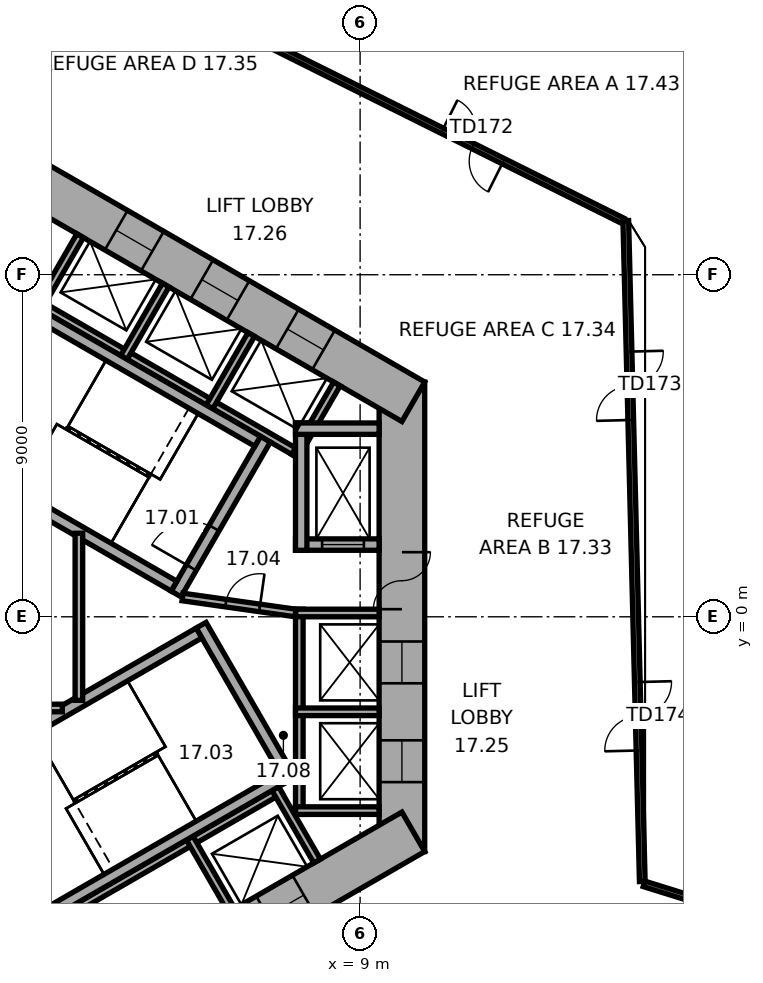
"""IFC4 building model, lengths in metres.
Left out: names, types, materials, properties, quantities, classifications, styles, units other than length and angle.
Written with IfcOpenShell. Run it as: python <this file> out.ifc"""

import sys

from ifc_helpers import new_model, si_unit, direction, frame, frame_2d, origin, place, context, subcontext, project, spatial, rectangle, extrude, element, fill, save


model = new_model("IFC4")
c1 = context("Model", 3, precision=1e-05, world=origin(), true_north=direction((0.0, 1.0)))
c2 = subcontext(c1, "Body", "Model", "MODEL_VIEW")
j1 = project(units=[si_unit("LENGTHUNIT", "METRE"), si_unit("PLANEANGLEUNIT", "RADIAN")], contexts=[c1])
p1 = place(None, origin())
s1 = spatial("IfcSite", under=j1, at=p1, CompositionType="ELEMENT")
p2 = place(p1, origin())
s2 = spatial("IfcBuilding", under=s1, at=p2, CompositionType="ELEMENT")
p3 = place(p2, frame((0.0, 0.0, 77.0)))
s3 = spatial("IfcBuildingStorey", under=s2, at=p3, CompositionType="ELEMENT", Elevation=77.0)
p4 = place(p3, frame((10.1, -6.177, 0.0), z_axis=(0.0, 0.0, 1.0), x_axis=(0.0, 1.0, 0.0)))
e1 = element("IfcWall", 1, at=p4, inside=s3, PredefinedType="SHEAR", context=c2, shape_type="SweptSolid", body=[
    extrude(rectangle(XDim=12.355, YDim=1.2, at=frame_2d((6.177, 0.0))), origin(), (0.0, 0.0, 1.0), 6.6),
])
p5 = place(p4, frame((6.378, 0.0, 0.0)))
e2 = element("IfcOpeningElement", 2, at=p5, cuts=e1, PredefinedType="OPENING", context=c2, shape_type="SweptSolid", body=[
    extrude(rectangle(XDim=1.5, YDim=2.1, at=frame_2d((0.75, 1.05))), frame((0.0, 0.61, 0.0), z_axis=(0.0, -1.0, 0.0), x_axis=(1.0, 0.0, 0.0)), (0.0, 0.0, 1.0), 1.22),
])
p6 = place(p4, frame((1.828, 0.0, 0.0)))
e3 = element("IfcOpeningElement", 3, at=p6, cuts=e1, PredefinedType="OPENING", context=c2, shape_type="SweptSolid", body=[
    extrude(rectangle(XDim=1.1, YDim=2.1, at=frame_2d((0.55, 1.05))), frame((0.0, 0.61, 0.0), z_axis=(0.0, -1.0, 0.0), x_axis=(1.0, 0.0, 0.0)), (0.0, 0.0, 1.0), 1.22),
])
p7 = place(p4, frame((4.427, 0.0, 0.0)))
e4 = element("IfcOpeningElement", 4, at=p7, cuts=e1, PredefinedType="OPENING", context=c2, shape_type="SweptSolid", body=[
    extrude(rectangle(XDim=1.1, YDim=2.1, at=frame_2d((0.55, 1.05))), frame((0.0, 0.61, 0.0), z_axis=(0.0, -1.0, 0.0), x_axis=(1.0, 0.0, 0.0)), (0.0, 0.0, 1.0), 1.22),
])
p8 = place(p3, frame((10.4, 5.658, 0.0), z_axis=(0.0, 0.0, 1.0), x_axis=(-0.866021384402, 0.500006961711, 0.0)))
e5 = element("IfcWall", 5, at=p8, inside=s3, PredefinedType="SHEAR", context=c2, shape_type="SweptSolid", body=[
    extrude(rectangle(XDim=12.355, YDim=1.2, at=frame_2d((6.178, 0.0))), origin(), (0.0, 0.0, 1.0), 6.6),
])
p9 = place(p8, frame((2.728, 0.0, 0.0)))
e6 = element("IfcOpeningElement", 6, at=p9, cuts=e5, PredefinedType="OPENING", context=c2, shape_type="SweptSolid", body=[
    extrude(rectangle(XDim=1.1, YDim=2.1, at=frame_2d((0.55, 1.05))), frame((0.0, 0.61, 0.0), z_axis=(0.0, -1.0, 0.0), x_axis=(1.0, 0.0, 0.0)), (0.0, 0.0, 1.0), 1.22),
])
p10 = place(p8, frame((5.328, 0.0, 0.0)))
e7 = element("IfcOpeningElement", 7, at=p10, cuts=e5, PredefinedType="OPENING", context=c2, shape_type="SweptSolid", body=[
    extrude(rectangle(XDim=1.1, YDim=2.1, at=frame_2d((0.55, 1.05))), frame((0.0, 0.61, 0.0), z_axis=(0.0, -1.0, 0.0), x_axis=(1.0, 0.0, 0.0)), (0.0, 0.0, 1.0), 1.22),
])
p11 = place(p8, frame((7.928, 0.0, 0.0)))
e8 = element("IfcOpeningElement", 8, at=p11, cuts=e5, PredefinedType="OPENING", context=c2, shape_type="SweptSolid", body=[
    extrude(rectangle(XDim=1.1, YDim=2.1, at=frame_2d((0.55, 1.05))), frame((0.0, 0.61, 0.0), z_axis=(0.0, -1.0, 0.0), x_axis=(1.0, 0.0, 0.0)), (0.0, 0.0, 1.0), 1.22),
])
p12 = place(p3, frame((-0.3, -11.836, 0.0), z_axis=(0.0, 0.0, 1.0), x_axis=(0.866021384402, 0.500006961711, 0.0)))
e9 = element("IfcWall", 9, at=p12, inside=s3, PredefinedType="SHEAR", context=c2, shape_type="SweptSolid", body=[
    extrude(rectangle(XDim=12.355, YDim=1.2, at=frame_2d((6.178, 0.0))), origin(), (0.0, 0.0, 1.0), 6.6),
])
p13 = place(p12, frame((4.128, 0.0, 0.0)))
e10 = element("IfcOpeningElement", 10, at=p13, cuts=e9, PredefinedType="OPENING", context=c2, shape_type="SweptSolid", body=[
    extrude(rectangle(XDim=0.9, YDim=2.1, at=frame_2d((0.45, 1.05))), frame((0.0, 0.61, 0.0), z_axis=(0.0, -1.0, 0.0), x_axis=(1.0, 0.0, 0.0)), (0.0, 0.0, 1.0), 1.22),
])
p14 = place(p12, frame((7.928, 0.0, 0.0)))
e11 = element("IfcOpeningElement", 11, at=p14, cuts=e9, PredefinedType="OPENING", context=c2, shape_type="SweptSolid", body=[
    extrude(rectangle(XDim=1.1, YDim=2.1, at=frame_2d((0.55, 1.05))), frame((0.0, 0.61, 0.0), z_axis=(0.0, -1.0, 0.0), x_axis=(1.0, 0.0, 0.0)), (0.0, 0.0, 1.0), 1.22),
])
p15 = place(p3, frame((0.113, 18.297, 0.0), z_axis=(0.0, 0.0, 1.0), x_axis=(0.894932628477, -0.446201289204, 0.0)))
e12 = element("IfcWall", 12, at=p15, inside=s3, PredefinedType="STANDARD", context=c2, shape_type="SweptSolid", body=[
    extrude(rectangle(XDim=17.659, YDim=0.15, at=frame_2d((8.83, 0.0))), origin(), (0.0, 0.0, 1.0), 2.6),
])
p16 = place(p15, frame((3.515, 0.0, 0.0)))
e13 = element("IfcOpeningElement", 13, at=p16, cuts=e12, PredefinedType="OPENING", context=c2, shape_type="SweptSolid", body=[
    extrude(rectangle(XDim=1.8, YDim=2.4, at=frame_2d((0.9, 1.2))), frame((0.0, 0.085, 0.0), z_axis=(0.0, -1.0, 0.0), x_axis=(1.0, 0.0, 0.0)), (0.0, 0.0, 1.0), 0.17),
])
p17 = place(p15, frame((12.344, 0.0, 0.0)))
e14 = element("IfcOpeningElement", 14, at=p17, cuts=e12, PredefinedType="OPENING", context=c2, shape_type="SweptSolid", body=[
    extrude(rectangle(XDim=1.8, YDim=2.4, at=frame_2d((0.9, 1.2))), frame((0.0, 0.085, 0.0), z_axis=(0.0, -1.0, 0.0), x_axis=(1.0, 0.0, 0.0)), (0.0, 0.0, 1.0), 0.17),
])
p18 = place(p3, frame((15.991, 10.425, 0.0), z_axis=(0.0, 0.0, 1.0), x_axis=(0.024967645853, -0.999688259739, 0.0)))
e15 = element("IfcWall", 15, at=p18, inside=s3, PredefinedType="STANDARD", context=c2, shape_type="SweptSolid", body=[
    extrude(rectangle(XDim=17.396, YDim=0.15, at=frame_2d((8.698, 0.0))), origin(), (0.0, 0.0, 1.0), 2.6),
])
p19 = place(p18, frame((3.449, 0.0, 0.0)))
e16 = element("IfcOpeningElement", 16, at=p19, cuts=e15, PredefinedType="OPENING", context=c2, shape_type="SweptSolid", body=[
    extrude(rectangle(XDim=1.8, YDim=2.4, at=frame_2d((0.9, 1.2))), frame((0.0, 0.085, 0.0), z_axis=(0.0, -1.0, 0.0), x_axis=(1.0, 0.0, 0.0)), (0.0, 0.0, 1.0), 0.17),
])
p20 = place(p18, frame((12.147, 0.0, 0.0)))
e17 = element("IfcOpeningElement", 17, at=p20, cuts=e15, PredefinedType="OPENING", context=c2, shape_type="SweptSolid", body=[
    extrude(rectangle(XDim=1.8, YDim=2.4, at=frame_2d((0.9, 1.2))), frame((0.0, 0.085, 0.0), z_axis=(0.0, -1.0, 0.0), x_axis=(1.0, 0.0, 0.0)), (0.0, 0.0, 1.0), 0.17),
])
p21 = place(p3, frame((16.471, -7.027, 0.0), z_axis=(0.0, 0.0, 1.0), x_axis=(0.954937386514, -0.296807324434, 0.0)))
e18 = element("IfcWall", 18, at=p21, inside=s3, PredefinedType="STANDARD", context=c2, shape_type="SweptSolid", body=[
    extrude(rectangle(XDim=5.362, YDim=0.15, at=frame_2d((2.681, 0.0))), origin(), (0.0, 0.0, 1.0), 2.6),
])
p22 = place(p3, frame((7.4, -5.2, 0.0), z_axis=(0.0, 0.0, 1.0), x_axis=(0.0, 1.0, 0.0)))
e19 = element("IfcWall", 19, at=p22, inside=s3, PredefinedType="PARTITIONING", context=c2, shape_type="SweptSolid", body=[
    extrude(rectangle(XDim=5.4, YDim=0.2, at=frame_2d((2.7, 0.0))), origin(), (0.0, 0.0, 1.0), 6.35),
])
for number, where, z_axis, x_axis in (
    (20, (7.3, -5.1, 0.0), (0.0, 0.0, 1.0), (1.0, 0.0, 0.0)),
    (21, (7.3, -2.5, 0.0), (0.0, 0.0, 1.0), (1.0, 0.0, 0.0)),
    (22, (7.3, 0.1, 0.0), (0.0, 0.0, 1.0), (1.0, 0.0, 0.0)),
):
    element("IfcWall", number, at=place(p3, frame(where, z_axis=z_axis, x_axis=x_axis)), inside=s3, PredefinedType="PARTITIONING", context=c2, shape_type="SweptSolid", body=[
        extrude(rectangle(XDim=2.2, YDim=0.2, at=frame_2d((1.1, 0.0))), origin(), (0.0, 0.0, 1.0), 6.35),
    ])
p23 = place(p3, frame((7.424, 4.259, 0.0), z_axis=(0.0, 0.0, 1.0), x_axis=(-0.866026010844, 0.49999894854, 0.0)))
e23 = element("IfcWall", 23, at=p23, inside=s3, PredefinedType="PARTITIONING", context=c2, shape_type="SweptSolid", body=[
    extrude(rectangle(XDim=8.0, YDim=0.2, at=frame_2d((4.0, 0.0))), origin(), (0.0, 0.0, 1.0), 6.35),
])
for number, where, z_axis, x_axis in (
    (24, (7.287, 4.222, 0.0), (0.0, 0.0, 1.0), (0.5, 0.866, 0.0)),
    (25, (5.036, 5.522, 0.0), (0.0, 0.0, 1.0), (0.5, 0.866, 0.0)),
    (26, (2.784, 6.822, 0.0), (0.0, 0.0, 1.0), (0.5, 0.866, 0.0)),
    (27, (0.532, 8.122, 0.0), (0.0, 0.0, 1.0), (0.5, 0.866, 0.0)),
):
    element("IfcWall", number, at=place(p3, frame(where, z_axis=z_axis, x_axis=x_axis)), inside=s3, PredefinedType="PARTITIONING", context=c2, shape_type="SweptSolid", body=[
        extrude(rectangle(XDim=2.2, YDim=0.2, at=frame_2d((1.1, 0.0))), origin(), (0.0, 0.0, 1.0), 6.35),
    ])
p24 = place(p3, frame((-0.024, -8.559, 0.0), z_axis=(0.0, 0.0, 1.0), x_axis=(0.866026010844, 0.49999894854, 0.0)))
e28 = element("IfcWall", 28, at=p24, inside=s3, PredefinedType="PARTITIONING", context=c2, shape_type="SweptSolid", body=[
    extrude(rectangle(XDim=8.0, YDim=0.2, at=frame_2d((4.0, 0.0))), origin(), (0.0, 0.0, 1.0), 6.35),
])
for number, where, z_axis, x_axis in (
    (29, (4.516, -5.822, 0.0), (0.0, 0.0, 1.0), (0.5, -0.866, 0.0)),
    (30, (6.768, -4.522, 0.0), (0.0, 0.0, 1.0), (0.5, -0.866, 0.0)),
):
    element("IfcWall", number, at=place(p3, frame(where, z_axis=z_axis, x_axis=x_axis)), inside=s3, PredefinedType="PARTITIONING", context=c2, shape_type="SweptSolid", body=[
        extrude(rectangle(XDim=2.2, YDim=0.2, at=frame_2d((1.1, 0.0))), origin(), (0.0, 0.0, 1.0), 6.35),
    ])
p25 = place(p3, frame((4.158, 0.602, 0.0), z_axis=(0.0, 0.0, 1.0), x_axis=(0.499977259774, 0.866038532462, 0.0)))
e31 = element("IfcWall", 31, at=p25, inside=s3, PredefinedType="SHEAR", context=c2, shape_type="SweptSolid", body=[
    extrude(rectangle(XDim=4.7, YDim=0.3, at=frame_2d((2.35, 0.0))), origin(), (0.0, 0.0, 1.0), 6.35),
])
p26 = place(p25, frame((0.8, 0.0, 0.0)))
e32 = element("IfcOpeningElement", 32, at=p26, cuts=e31, PredefinedType="OPENING", context=c2, shape_type="SweptSolid", body=[
    extrude(rectangle(XDim=1.2, YDim=2.1, at=frame_2d((0.6, 1.05))), frame((0.0, 0.16, 0.0), z_axis=(0.0, -1.0, 0.0), x_axis=(1.0, 0.0, 0.0)), (0.0, 0.0, 1.0), 0.32),
])
for number, where, z_axis, x_axis in (
    (33, (4.103, 0.807, 0.0), (0.0, 0.0, 1.0), (-0.866, 0.5, 0.0)),
    (34, (6.303, 4.617, 0.0), (0.0, 0.0, 1.0), (-0.866, 0.5, 0.0)),
):
    element("IfcWall", number, at=place(p3, frame(where, z_axis=z_axis, x_axis=x_axis)), inside=s3, PredefinedType="SHEAR", context=c2, shape_type="SweptSolid", body=[
        extrude(rectangle(XDim=7.06, YDim=0.3, at=frame_2d((3.53, 0.0))), origin(), (0.0, 0.0, 1.0), 6.35),
    ])
p27 = place(p3, frame((-1.558, -3.902, 0.0), z_axis=(0.0, 0.0, 1.0), x_axis=(0.499977259774, -0.866038532462, 0.0)))
e35 = element("IfcWall", 35, at=p27, inside=s3, PredefinedType="SHEAR", context=c2, shape_type="SweptSolid", body=[
    extrude(rectangle(XDim=4.7, YDim=0.3, at=frame_2d((2.35, 0.0))), origin(), (0.0, 0.0, 1.0), 6.35),
])
p28 = place(p27, frame((0.8, 0.0, 0.0)))
e36 = element("IfcOpeningElement", 36, at=p28, cuts=e35, PredefinedType="OPENING", context=c2, shape_type="SweptSolid", body=[
    extrude(rectangle(XDim=1.2, YDim=2.1, at=frame_2d((0.6, 1.05))), frame((0.0, 0.16, 0.0), z_axis=(0.0, -1.0, 0.0), x_axis=(1.0, 0.0, 0.0)), (0.0, 0.0, 1.0), 0.32),
])
p29 = place(p3, frame((4.816, -0.222, 0.0), z_axis=(0.0, 0.0, 1.0), x_axis=(0.499977259774, -0.866038532462, 0.0)))
e37 = element("IfcWall", 37, at=p29, inside=s3, PredefinedType="SHEAR", context=c2, shape_type="SweptSolid", body=[
    extrude(rectangle(XDim=4.7, YDim=0.3, at=frame_2d((2.35, 0.0))), origin(), (0.0, 0.0, 1.0), 6.35),
])
for number, where, z_axis, x_axis in (
    (38, (-1.353, -3.957, 0.0), (0.0, 0.0, 1.0), (0.866, 0.5, 0.0)),
    (39, (0.847, -7.767, 0.0), (0.0, 0.0, 1.0), (0.866, 0.5, 0.0)),
):
    element("IfcWall", number, at=place(p3, frame(where, z_axis=z_axis, x_axis=x_axis)), inside=s3, PredefinedType="SHEAR", context=c2, shape_type="SweptSolid", body=[
        extrude(rectangle(XDim=7.06, YDim=0.3, at=frame_2d((3.53, 0.0))), origin(), (0.0, 0.0, 1.0), 6.35),
    ])
p30 = place(p3, frame((7.3, 1.9, 0.0), z_axis=(0.0, 0.0, 1.0), x_axis=(1.0, 0.0, 0.0)))
e40 = element("IfcWall", 40, at=p30, inside=s3, PredefinedType="SHEAR", context=c2, shape_type="SweptSolid", body=[
    extrude(rectangle(XDim=2.2, YDim=0.3, at=frame_2d((1.1, 0.0))), origin(), (0.0, 0.0, 1.0), 6.35),
])
p31 = place(p30, frame((0.7, 0.0, 0.0)))
e41 = element("IfcOpeningElement", 41, at=p31, cuts=e40, PredefinedType="OPENING", context=c2, shape_type="SweptSolid", body=[
    extrude(rectangle(XDim=1.1, YDim=2.1, at=frame_2d((0.55, 1.05))), frame((0.0, 0.16, 0.0), z_axis=(0.0, -1.0, 0.0), x_axis=(1.0, 0.0, 0.0)), (0.0, 0.0, 1.0), 0.32),
])
p32 = place(p3, frame((7.45, 1.75, 0.0), z_axis=(0.0, 0.0, 1.0), x_axis=(0.0, 1.0, 0.0)))
e42 = element("IfcWall", 42, at=p32, inside=s3, PredefinedType="SHEAR", context=c2, shape_type="SweptSolid", body=[
    extrude(rectangle(XDim=3.35, YDim=0.3, at=frame_2d((1.675, 0.0))), origin(), (0.0, 0.0, 1.0), 6.35),
])
p33 = place(p3, frame((7.3, 4.95, 0.0), z_axis=(0.0, 0.0, 1.0), x_axis=(1.0, 0.0, 0.0)))
e43 = element("IfcWall", 43, at=p33, inside=s3, PredefinedType="SHEAR", context=c2, shape_type="SweptSolid", body=[
    extrude(rectangle(XDim=2.2, YDim=0.3, at=frame_2d((1.1, 0.0))), origin(), (0.0, 0.0, 1.0), 6.35),
])
p34 = place(p3, frame((4.327, 0.521, 0.0), z_axis=(0.0, 0.0, 1.0), x_axis=(0.990124376366, -0.14019172346, 0.0)))
e44 = element("IfcWall", 44, at=p34, inside=s3, PredefinedType="PARTITIONING", context=c2, shape_type="SweptSolid", body=[
    extrude(rectangle(XDim=3.002, YDim=0.2, at=frame_2d((1.501, 0.0))), origin(), (0.0, 0.0, 1.0), 6.35),
])
p35 = place(p34, frame((1.15, 0.0, 0.0)))
e45 = element("IfcOpeningElement", 45, at=p35, cuts=e44, PredefinedType="OPENING", context=c2, shape_type="SweptSolid", body=[
    extrude(rectangle(XDim=0.9, YDim=2.1, at=frame_2d((0.45, 1.05))), frame((0.0, 0.11, 0.0), z_axis=(0.0, -1.0, 0.0), x_axis=(1.0, 0.0, 0.0)), (0.0, 0.0, 1.0), 0.22),
])
p36 = place(p3, frame((-2.72, -2.4, 0.0), z_axis=(0.0, 0.0, 1.0), x_axis=(1.0, 0.0, 0.0)))
e46 = element("IfcWall", 46, at=p36, inside=s3, PredefinedType="PARTITIONING", context=c2, shape_type="SweptSolid", body=[
    extrude(rectangle(XDim=3.883, YDim=0.2, at=frame_2d((1.941, 0.0))), origin(), (0.0, 0.0, 1.0), 6.35),
])
p37 = place(p3, frame((1.6, -2.198, 0.0), z_axis=(0.0, 0.0, 1.0), x_axis=(0.0, 1.0, 0.0)))
e47 = element("IfcWall", 47, at=p37, inside=s3, PredefinedType="PARTITIONING", context=c2, shape_type="SweptSolid", body=[
    extrude(rectangle(XDim=4.397, YDim=0.2, at=frame_2d((2.198, 0.0))), origin(), (0.0, 0.0, 1.0), 6.35),
])
p38 = place(p17, origin())
e48 = element("IfcDoor", 48, at=p38, inside=s3, OperationType="DOUBLE_DOOR_DOUBLE_SWING", PredefinedType="DOOR", context=c2, shape_type="SweptSolid", body=[
    extrude(rectangle(XDim=1.8, YDim=2.4, at=frame_2d((0.9, 1.2))), frame((0.0, 0.025, 0.0), z_axis=(0.0, -1.0, 0.0), x_axis=(1.0, 0.0, 0.0)), (0.0, 0.0, 1.0), 0.05),
])
fill(e14, e48)
p39 = place(p19, origin())
e49 = element("IfcDoor", 49, at=p39, inside=s3, OperationType="DOUBLE_DOOR_DOUBLE_SWING", PredefinedType="DOOR", context=c2, shape_type="SweptSolid", body=[
    extrude(rectangle(XDim=1.8, YDim=2.4, at=frame_2d((0.9, 1.2))), frame((0.0, 0.025, 0.0), z_axis=(0.0, -1.0, 0.0), x_axis=(1.0, 0.0, 0.0)), (0.0, 0.0, 1.0), 0.05),
])
fill(e16, e49)
p40 = place(p20, origin())
e50 = element("IfcDoor", 50, at=p40, inside=s3, OperationType="DOUBLE_DOOR_DOUBLE_SWING", PredefinedType="DOOR", context=c2, shape_type="SweptSolid", body=[
    extrude(rectangle(XDim=1.8, YDim=2.4, at=frame_2d((0.9, 1.2))), frame((0.0, 0.025, 0.0), z_axis=(0.0, -1.0, 0.0), x_axis=(1.0, 0.0, 0.0)), (0.0, 0.0, 1.0), 0.05),
])
fill(e17, e50)
p41 = place(p5, origin())
e51 = element("IfcDoor", 51, at=p41, inside=s3, OperationType="DOUBLE_DOOR_SINGLE_SWING", PredefinedType="DOOR", context=c2, shape_type="SweptSolid", body=[
    extrude(rectangle(XDim=1.5, YDim=2.1, at=frame_2d((0.75, 1.05))), frame((0.0, 0.025, 0.0), z_axis=(0.0, -1.0, 0.0), x_axis=(1.0, 0.0, 0.0)), (0.0, 0.0, 1.0), 0.05),
])
fill(e2, e51)
p42 = place(p26, origin())
e52 = element("IfcDoor", 52, at=p42, inside=s3, OperationType="SINGLE_SWING_RIGHT", PredefinedType="DOOR", context=c2, shape_type="SweptSolid", body=[
    extrude(rectangle(XDim=1.2, YDim=2.1, at=frame_2d((0.6, 1.05))), frame((0.0, 0.025, 0.0), z_axis=(0.0, -1.0, 0.0), x_axis=(1.0, 0.0, 0.0)), (0.0, 0.0, 1.0), 0.05),
])
fill(e32, e52)
p43 = place(p35, origin())
e53 = element("IfcDoor", 53, at=p43, inside=s3, OperationType="SINGLE_SWING_LEFT", PredefinedType="DOOR", context=c2, shape_type="SweptSolid", body=[
    extrude(rectangle(XDim=0.9, YDim=2.1, at=frame_2d((0.45, 1.05))), frame((0.0, 0.025, 0.0), z_axis=(0.0, -1.0, 0.0), x_axis=(1.0, 0.0, 0.0)), (0.0, 0.0, 1.0), 0.05),
])
fill(e45, e53)
p44 = place(p31, origin())
e54 = element("IfcDoor", 54, at=p44, inside=s3, OperationType="DOUBLE_DOOR_SLIDING", PredefinedType="DOOR", context=c2, shape_type="SweptSolid", body=[
    extrude(rectangle(XDim=1.1, YDim=2.1, at=frame_2d((0.55, 1.05))), frame((0.0, 0.025, 0.0), z_axis=(0.0, -1.0, 0.0), x_axis=(1.0, 0.0, 0.0)), (0.0, 0.0, 1.0), 0.05),
])
fill(e41, e54)
p45 = place(p6, origin())
e55 = element("IfcDoor", 55, at=p45, inside=s3, OperationType="DOUBLE_DOOR_SLIDING", PredefinedType="DOOR", context=c2, shape_type="SweptSolid", body=[
    extrude(rectangle(XDim=1.1, YDim=2.1, at=frame_2d((0.55, 1.05))), frame((0.0, 0.025, 0.0), z_axis=(0.0, -1.0, 0.0), x_axis=(1.0, 0.0, 0.0)), (0.0, 0.0, 1.0), 0.05),
])
fill(e3, e55)
p46 = place(p7, origin())
e56 = element("IfcDoor", 56, at=p46, inside=s3, OperationType="DOUBLE_DOOR_SLIDING", PredefinedType="DOOR", context=c2, shape_type="SweptSolid", body=[
    extrude(rectangle(XDim=1.1, YDim=2.1, at=frame_2d((0.55, 1.05))), frame((0.0, 0.025, 0.0), z_axis=(0.0, -1.0, 0.0), x_axis=(1.0, 0.0, 0.0)), (0.0, 0.0, 1.0), 0.05),
])
fill(e4, e56)
p47 = place(p9, origin())
e57 = element("IfcDoor", 57, at=p47, inside=s3, OperationType="DOUBLE_DOOR_SLIDING", PredefinedType="DOOR", context=c2, shape_type="SweptSolid", body=[
    extrude(rectangle(XDim=1.1, YDim=2.1, at=frame_2d((0.55, 1.05))), frame((0.0, 0.025, 0.0), z_axis=(0.0, -1.0, 0.0), x_axis=(1.0, 0.0, 0.0)), (0.0, 0.0, 1.0), 0.05),
])
fill(e6, e57)
p48 = place(p10, origin())
e58 = element("IfcDoor", 58, at=p48, inside=s3, OperationType="DOUBLE_DOOR_SLIDING", PredefinedType="DOOR", context=c2, shape_type="SweptSolid", body=[
    extrude(rectangle(XDim=1.1, YDim=2.1, at=frame_2d((0.55, 1.05))), frame((0.0, 0.025, 0.0), z_axis=(0.0, -1.0, 0.0), x_axis=(1.0, 0.0, 0.0)), (0.0, 0.0, 1.0), 0.05),
])
fill(e7, e58)
p49 = place(p11, origin())
e59 = element("IfcDoor", 59, at=p49, inside=s3, OperationType="DOUBLE_DOOR_SLIDING", PredefinedType="DOOR", context=c2, shape_type="SweptSolid", body=[
    extrude(rectangle(XDim=1.1, YDim=2.1, at=frame_2d((0.55, 1.05))), frame((0.0, 0.025, 0.0), z_axis=(0.0, -1.0, 0.0), x_axis=(1.0, 0.0, 0.0)), (0.0, 0.0, 1.0), 0.05),
])
fill(e8, e59)
p50 = place(p14, origin())
e60 = element("IfcDoor", 60, at=p50, inside=s3, OperationType="DOUBLE_DOOR_SLIDING", PredefinedType="DOOR", context=c2, shape_type="SweptSolid", body=[
    extrude(rectangle(XDim=1.1, YDim=2.1, at=frame_2d((0.55, 1.05))), frame((0.0, 0.025, 0.0), z_axis=(0.0, -1.0, 0.0), x_axis=(1.0, 0.0, 0.0)), (0.0, 0.0, 1.0), 0.05),
])
fill(e11, e60)
save(model, sys.argv[1])
